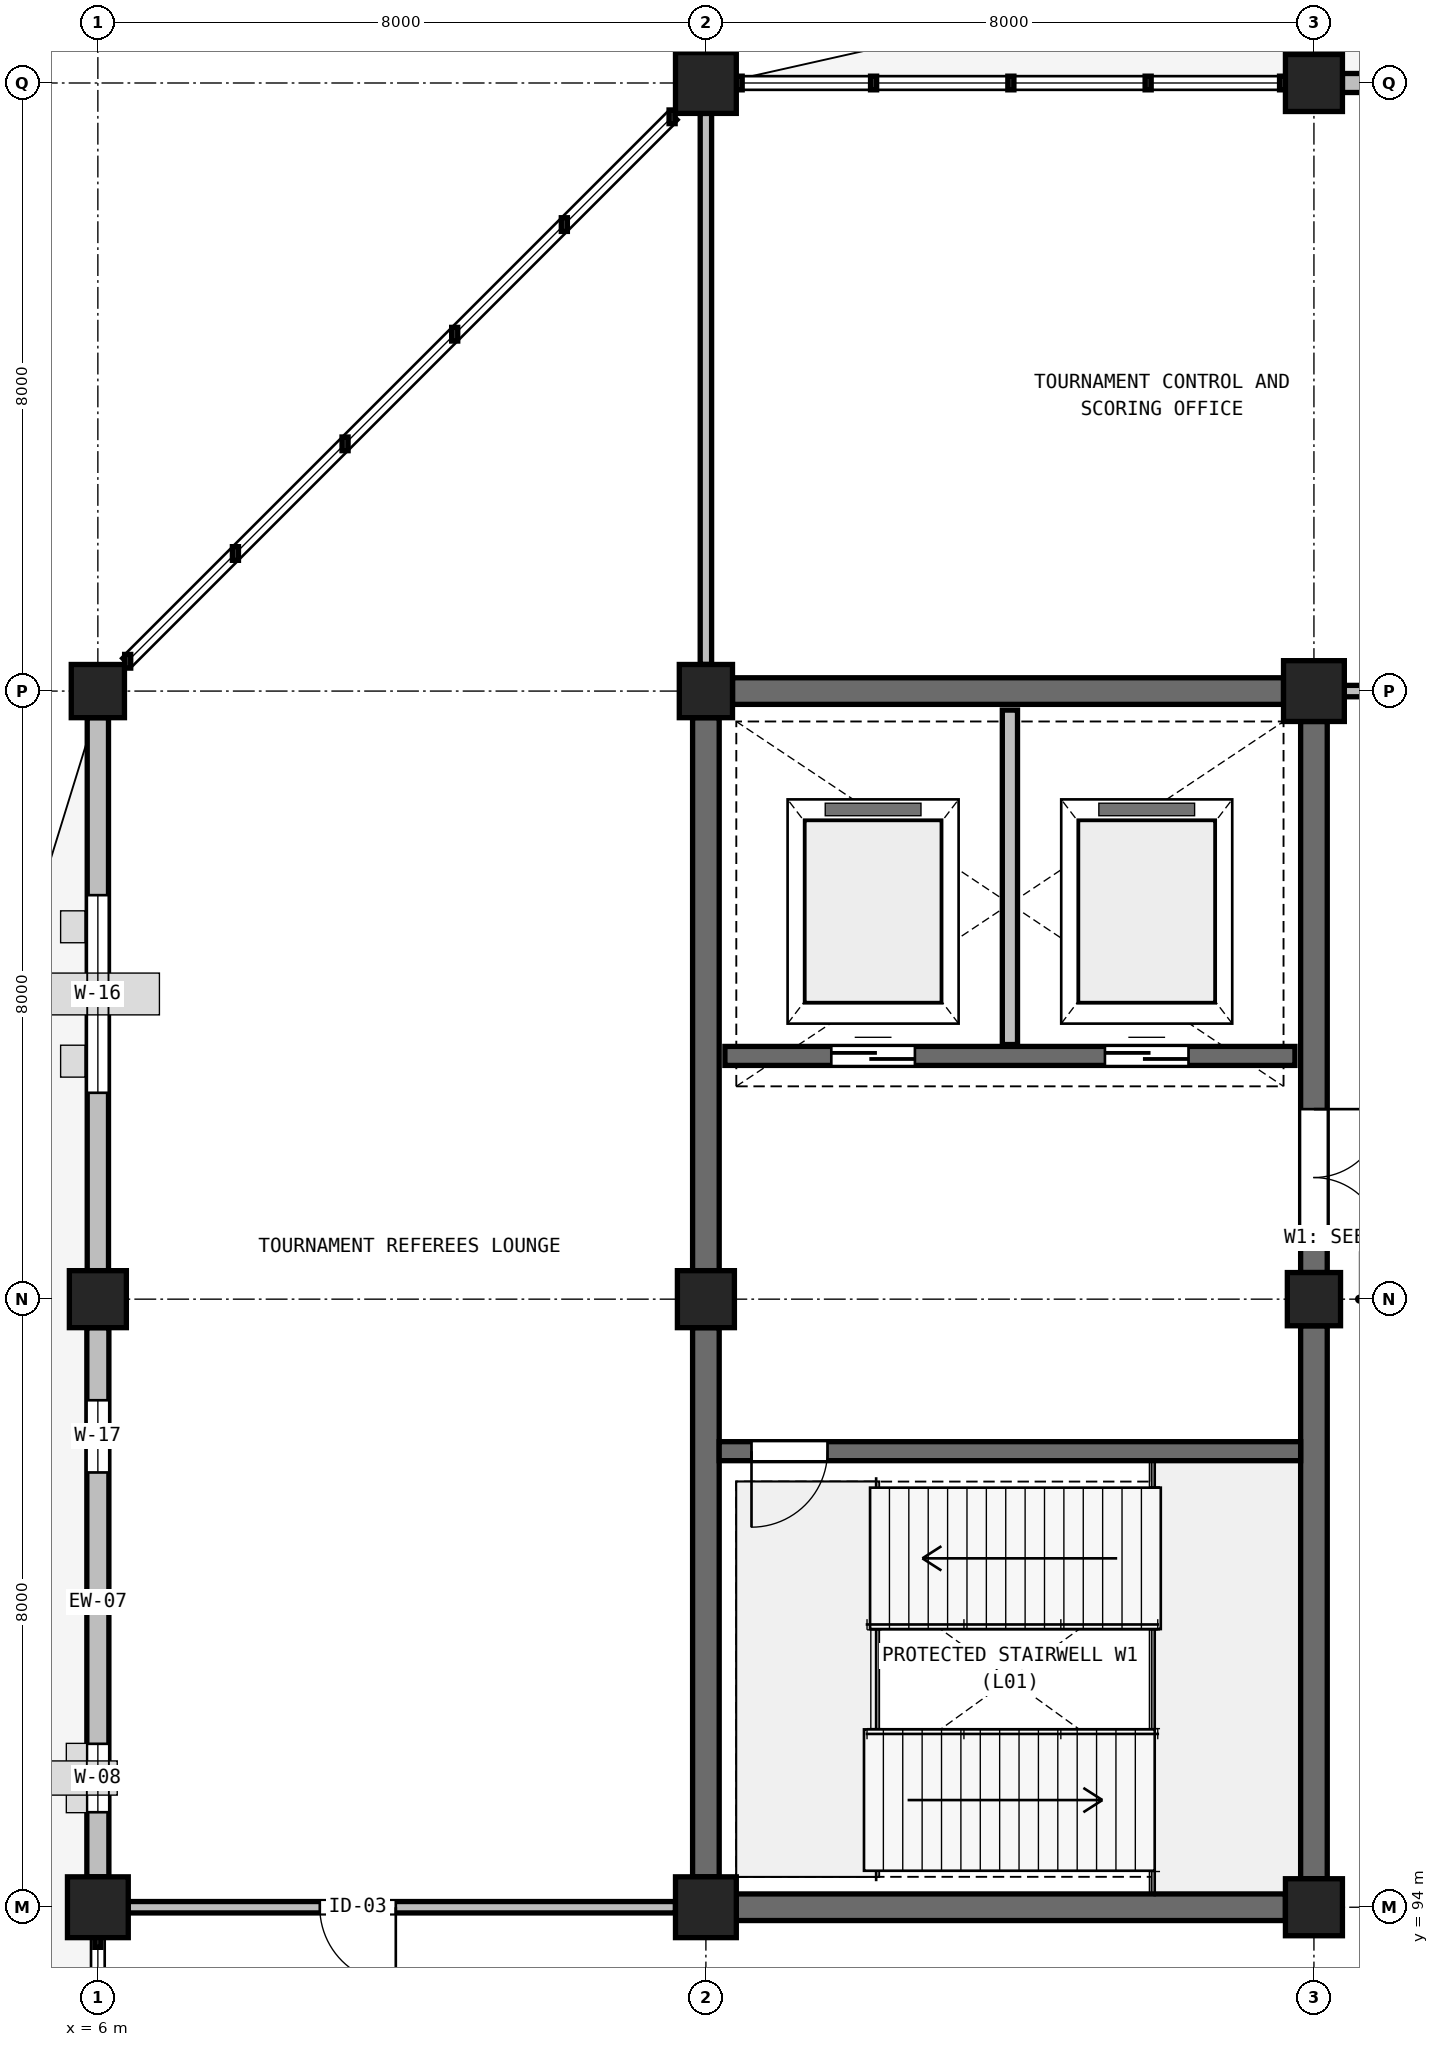
"""IFC4 building model, lengths in metres.
Left out: names, types, materials, properties, quantities, classifications, styles, units other than length and angle.
Written with IfcOpenShell. Run it as: python <this file> out.ifc"""

import sys

from ifc_helpers import new_model, si_unit, direction, frame, frame_2d, origin, origin_2d, place, context, subcontext, project, spatial, rectangle, extrude, element, fill, save


model = new_model("IFC4")
c1 = context("Model", 3, precision=1e-05, world=origin(), true_north=direction((0.0, 1.0)))
c2 = subcontext(c1, "Body", "Model", "MODEL_VIEW")
j1 = project(units=[si_unit("LENGTHUNIT", "METRE"), si_unit("PLANEANGLEUNIT", "RADIAN")], contexts=[c1])
p1 = place(None, origin())
s1 = spatial("IfcSite", under=j1, at=p1, CompositionType="ELEMENT")
p2 = place(p1, origin())
s2 = spatial("IfcBuilding", under=s1, at=p2, CompositionType="ELEMENT")
p3 = place(p2, frame((0.0, 0.0, 5.4)))
s3 = spatial("IfcBuildingStorey", under=s2, at=p3, CompositionType="ELEMENT", Elevation=5.4)
p4 = place(p3, frame((6.0, 94.0, 0.0), z_axis=(0.0, 0.0, 1.0), x_axis=(1.0, 0.0, 0.0)))
e1 = element("IfcColumn", 1, at=p4, inside=s3, PredefinedType="COLUMN", context=c2, shape_type="SweptSolid", body=[
    extrude(rectangle(XDim=0.8, YDim=0.8, at=origin_2d()), origin(), (0.0, 0.0, 1.0), 5.4),
])
p5 = place(p3, frame((6.0, 102.0, 0.0), z_axis=(0.0, 0.0, 1.0), x_axis=(1.0, 0.0, 0.0)))
e2 = element("IfcColumn", 2, at=p5, inside=s3, PredefinedType="COLUMN", context=c2, shape_type="SweptSolid", body=[
    extrude(rectangle(XDim=0.75, YDim=0.75, at=origin_2d()), origin(), (0.0, 0.0, 1.0), 5.4),
])
p6 = place(p3, frame((6.0, 110.0, 0.0), z_axis=(0.0, 0.0, 1.0), x_axis=(1.0, 0.0, 0.0)))
e3 = element("IfcColumn", 3, at=p6, inside=s3, PredefinedType="COLUMN", context=c2, shape_type="SweptSolid", body=[
    extrude(rectangle(XDim=0.7, YDim=0.7, at=origin_2d()), origin(), (0.0, 0.0, 1.0), 5.4),
])
p7 = place(p3, frame((14.0, 94.0, 0.0), z_axis=(0.0, 0.0, 1.0), x_axis=(1.0, 0.0, 0.0)))
e4 = element("IfcColumn", 4, at=p7, inside=s3, PredefinedType="COLUMN", context=c2, shape_type="SweptSolid", body=[
    extrude(rectangle(XDim=0.8, YDim=0.8, at=origin_2d()), origin(), (0.0, 0.0, 1.0), 5.4),
])
p8 = place(p3, frame((14.0, 102.0, 0.0), z_axis=(0.0, 0.0, 1.0), x_axis=(1.0, 0.0, 0.0)))
e5 = element("IfcColumn", 5, at=p8, inside=s3, PredefinedType="COLUMN", context=c2, shape_type="SweptSolid", body=[
    extrude(rectangle(XDim=0.75, YDim=0.75, at=origin_2d()), origin(), (0.0, 0.0, 1.0), 5.4),
])
p9 = place(p3, frame((14.0, 110.0, 0.0), z_axis=(0.0, 0.0, 1.0), x_axis=(1.0, 0.0, 0.0)))
e6 = element("IfcColumn", 6, at=p9, inside=s3, PredefinedType="COLUMN", context=c2, shape_type="SweptSolid", body=[
    extrude(rectangle(XDim=0.7, YDim=0.7, at=origin_2d()), origin(), (0.0, 0.0, 1.0), 5.4),
])
p10 = place(p3, frame((14.0, 118.0, 0.0), z_axis=(0.0, 0.0, 1.0), x_axis=(1.0, 0.0, 0.0)))
e7 = element("IfcColumn", 7, at=p10, inside=s3, PredefinedType="COLUMN", context=c2, shape_type="SweptSolid", body=[
    extrude(rectangle(XDim=0.8, YDim=0.8, at=origin_2d()), origin(), (0.0, 0.0, 1.0), 5.4),
])
p11 = place(p3, frame((22.0, 94.0, 0.0), z_axis=(0.0, 0.0, 1.0), x_axis=(1.0, 0.0, 0.0)))
e8 = element("IfcColumn", 8, at=p11, inside=s3, PredefinedType="COLUMN", context=c2, shape_type="SweptSolid", body=[
    extrude(rectangle(XDim=0.75, YDim=0.75, at=origin_2d()), origin(), (0.0, 0.0, 1.0), 5.4),
])
p12 = place(p3, frame((22.0, 102.0, 0.0), z_axis=(0.0, 0.0, 1.0), x_axis=(1.0, 0.0, 0.0)))
e9 = element("IfcColumn", 9, at=p12, inside=s3, PredefinedType="COLUMN", context=c2, shape_type="SweptSolid", body=[
    extrude(rectangle(XDim=0.7, YDim=0.7, at=origin_2d()), origin(), (0.0, 0.0, 1.0), 5.4),
])
p13 = place(p3, frame((22.0, 110.0, 0.0), z_axis=(0.0, 0.0, 1.0), x_axis=(1.0, 0.0, 0.0)))
e10 = element("IfcColumn", 10, at=p13, inside=s3, PredefinedType="COLUMN", context=c2, shape_type="SweptSolid", body=[
    extrude(rectangle(XDim=0.8, YDim=0.8, at=origin_2d()), origin(), (0.0, 0.0, 1.0), 5.4),
])
p14 = place(p3, frame((22.0, 118.0, 0.0), z_axis=(0.0, 0.0, 1.0), x_axis=(1.0, 0.0, 0.0)))
e11 = element("IfcColumn", 11, at=p14, inside=s3, PredefinedType="COLUMN", context=c2, shape_type="SweptSolid", body=[
    extrude(rectangle(XDim=0.75, YDim=0.75, at=origin_2d()), origin(), (0.0, 0.0, 1.0), 5.4),
])
p15 = place(p3, frame((22.375, 118.0, 0.0), z_axis=(0.0, 0.0, 1.0), x_axis=(1.0, 0.0, 0.0)))
e12 = element("IfcWall", 12, at=p15, inside=s3, PredefinedType="SOLIDWALL", context=c2, shape_type="SweptSolid", body=[
    extrude(rectangle(XDim=7.275, YDim=0.25, at=frame_2d((3.637, 0.0))), origin(), (0.0, 0.0, 1.0), 4.14),
])
p16 = place(p15, frame((0.85, 0.0, 1.2)))
e13 = element("IfcOpeningElement", 13, at=p16, cuts=e12, PredefinedType="OPENING", context=c2, shape_type="SweptSolid", body=[
    extrude(rectangle(XDim=1.5, YDim=1.5, at=frame_2d((0.75, 0.75))), frame((0.0, 0.135, 0.0), z_axis=(0.0, -1.0, 0.0), x_axis=(1.0, 0.0, 0.0)), (0.0, 0.0, 1.0), 0.27),
])
p17 = place(p15, frame((4.97, 0.0, 1.05)))
e14 = element("IfcOpeningElement", 14, at=p17, cuts=e12, PredefinedType="OPENING", context=c2, shape_type="SweptSolid", body=[
    extrude(rectangle(XDim=1.35, YDim=1.65, at=frame_2d((0.675, 0.825))), frame((0.0, 0.135, 0.0), z_axis=(0.0, -1.0, 0.0), x_axis=(1.0, 0.0, 0.0)), (0.0, 0.0, 1.0), 0.27),
])
p18 = place(p3, frame((6.0, 94.4, 0.0), z_axis=(0.0, 0.0, 1.0), x_axis=(0.0, 1.0, 0.0)))
e15 = element("IfcWall", 15, at=p18, inside=s3, PredefinedType="SOLIDWALL", context=c2, shape_type="SweptSolid", body=[
    extrude(rectangle(XDim=7.225, YDim=0.29, at=frame_2d((3.613, 0.0))), origin(), (0.0, 0.0, 1.0), 4.34),
])
p19 = place(p18, frame((0.85, 0.0, 1.5)))
e16 = element("IfcOpeningElement", 16, at=p19, cuts=e15, PredefinedType="OPENING", context=c2, shape_type="SweptSolid", body=[
    extrude(rectangle(XDim=0.9, YDim=1.2, at=frame_2d((0.45, 0.6))), frame((0.0, 0.155, 0.0), z_axis=(0.0, -1.0, 0.0), x_axis=(1.0, 0.0, 0.0)), (0.0, 0.0, 1.0), 0.31),
])
p20 = place(p18, frame((5.32, 0.0, 1.05)))
e17 = element("IfcOpeningElement", 17, at=p20, cuts=e15, PredefinedType="OPENING", context=c2, shape_type="SweptSolid", body=[
    extrude(rectangle(XDim=0.95, YDim=1.65, at=frame_2d((0.475, 0.825))), frame((0.0, 0.155, 0.0), z_axis=(0.0, -1.0, 0.0), x_axis=(1.0, 0.0, 0.0)), (0.0, 0.0, 1.0), 0.31),
])
p21 = place(p3, frame((6.0, 102.375, 0.0), z_axis=(0.0, 0.0, 1.0), x_axis=(0.0, 1.0, 0.0)))
e18 = element("IfcWall", 18, at=p21, inside=s3, PredefinedType="SOLIDWALL", context=c2, shape_type="SweptSolid", body=[
    extrude(rectangle(XDim=7.275, YDim=0.28, at=frame_2d((3.637, 0.0))), origin(), (0.0, 0.0, 1.0), 4.29),
])
p22 = place(p21, frame((2.34, 0.0, 2.65)))
e19 = element("IfcOpeningElement", 19, at=p22, cuts=e18, PredefinedType="OPENING", context=c2, shape_type="SweptSolid", body=[
    extrude(rectangle(XDim=2.6, YDim=1.1, at=frame_2d((1.3, 0.55))), frame((0.0, 0.15, 0.0), z_axis=(0.0, -1.0, 0.0), x_axis=(1.0, 0.0, 0.0)), (0.0, 0.0, 1.0), 0.3),
])
p23 = place(p3, frame((14.4, 94.0, 0.0), z_axis=(0.0, 0.0, 1.0), x_axis=(1.0, 0.0, 0.0)))
e20 = element("IfcWall", 20, at=p23, inside=s3, PredefinedType="SHEAR", context=c2, shape_type="SweptSolid", body=[
    extrude(rectangle(XDim=7.225, YDim=0.35, at=frame_2d((3.613, 0.0))), origin(), (0.0, 0.0, 1.0), 5.18),
])
p24 = place(p3, frame((14.35, 110.0, 0.0), z_axis=(0.0, 0.0, 1.0), x_axis=(1.0, 0.0, 0.0)))
e21 = element("IfcWall", 21, at=p24, inside=s3, PredefinedType="SHEAR", context=c2, shape_type="SweptSolid", body=[
    extrude(rectangle(XDim=7.25, YDim=0.35, at=frame_2d((3.625, 0.0))), origin(), (0.0, 0.0, 1.0), 5.18),
])
p25 = place(p3, frame((14.0, 94.4, 0.0), z_axis=(0.0, 0.0, 1.0), x_axis=(0.0, 1.0, 0.0)))
e22 = element("IfcWall", 22, at=p25, inside=s3, PredefinedType="SHEAR", context=c2, shape_type="SweptSolid", body=[
    extrude(rectangle(XDim=7.225, YDim=0.35, at=frame_2d((3.613, 0.0))), origin(), (0.0, 0.0, 1.0), 5.18),
])
for number, where, z_axis, x_axis in (
    (23, (14.0, 102.375, 0.0), (0.0, 0.0, 1.0), (0.0, 1.0, 0.0)),
    (24, (22.0, 94.375, 0.0), (0.0, 0.0, 1.0), (0.0, 1.0, 0.0)),
):
    element("IfcWall", number, at=place(p3, frame(where, z_axis=z_axis, x_axis=x_axis)), inside=s3, PredefinedType="SHEAR", context=c2, shape_type="SweptSolid", body=[
        extrude(rectangle(XDim=7.275, YDim=0.35, at=frame_2d((3.637, 0.0))), origin(), (0.0, 0.0, 1.0), 5.18),
    ])
p26 = place(p3, frame((22.0, 102.35, 0.0), z_axis=(0.0, 0.0, 1.0), x_axis=(0.0, 1.0, 0.0)))
e25 = element("IfcWall", 25, at=p26, inside=s3, PredefinedType="SHEAR", context=c2, shape_type="SweptSolid", body=[
    extrude(rectangle(XDim=7.25, YDim=0.35, at=frame_2d((3.625, 0.0))), origin(), (0.0, 0.0, 1.0), 5.18),
])
p27 = place(p26, frame((0.35, 0.0, 0.0)))
e26 = element("IfcOpeningElement", 26, at=p27, cuts=e25, PredefinedType="OPENING", context=c2, shape_type="SweptSolid", body=[
    extrude(rectangle(XDim=1.8, YDim=2.2, at=frame_2d((0.9, 1.1))), frame((0.0, 0.185, 0.0), z_axis=(0.0, -1.0, 0.0), x_axis=(1.0, 0.0, 0.0)), (0.0, 0.0, 1.0), 0.37),
])
p28 = place(p3, frame((14.175, 100.0, 0.0), z_axis=(0.0, 0.0, 1.0), x_axis=(1.0, 0.0, 0.0)))
e27 = element("IfcWall", 27, at=p28, inside=s3, PredefinedType="SOLIDWALL", context=c2, shape_type="SweptSolid", body=[
    extrude(rectangle(XDim=7.65, YDim=0.25, at=frame_2d((3.825, 0.0))), origin(), (0.0, 0.0, 1.0), 5.18),
])
p29 = place(p28, frame((0.425, 0.0, 0.0)))
e28 = element("IfcOpeningElement", 28, at=p29, cuts=e27, PredefinedType="OPENING", context=c2, shape_type="SweptSolid", body=[
    extrude(rectangle(XDim=1.0, YDim=2.2, at=frame_2d((0.5, 1.1))), frame((0.0, 0.135, 0.0), z_axis=(0.0, -1.0, 0.0), x_axis=(1.0, 0.0, 0.0)), (0.0, 0.0, 1.0), 0.27),
])
p30 = place(p3, frame((14.25, 105.2, 0.0), z_axis=(0.0, 0.0, 1.0), x_axis=(1.0, 0.0, 0.0)))
e29 = element("IfcWall", 29, at=p30, inside=s3, PredefinedType="SOLIDWALL", context=c2, shape_type="SweptSolid", body=[
    extrude(rectangle(XDim=7.5, YDim=0.25, at=frame_2d((3.75, 0.0))), origin(), (0.0, 0.0, 1.0), 5.18),
])
p31 = place(p30, frame((1.4, 0.0, 0.0)))
e30 = element("IfcOpeningElement", 30, at=p31, cuts=e29, PredefinedType="OPENING", context=c2, shape_type="SweptSolid", body=[
    extrude(rectangle(XDim=1.1, YDim=2.2, at=frame_2d((0.55, 1.1))), frame((0.0, 0.135, 0.0), z_axis=(0.0, -1.0, 0.0), x_axis=(1.0, 0.0, 0.0)), (0.0, 0.0, 1.0), 0.27),
])
p32 = place(p30, frame((5.0, 0.0, 0.0)))
e31 = element("IfcOpeningElement", 31, at=p32, cuts=e29, PredefinedType="OPENING", context=c2, shape_type="SweptSolid", body=[
    extrude(rectangle(XDim=1.1, YDim=2.2, at=frame_2d((0.55, 1.1))), frame((0.0, 0.135, 0.0), z_axis=(0.0, -1.0, 0.0), x_axis=(1.0, 0.0, 0.0)), (0.0, 0.0, 1.0), 0.27),
])
p33 = place(p3, frame((18.0, 105.35, 0.0), z_axis=(0.0, 0.0, 1.0), x_axis=(0.0, 1.0, 0.0)))
e32 = element("IfcWall", 32, at=p33, inside=s3, PredefinedType="PARTITIONING", context=c2, shape_type="SweptSolid", body=[
    extrude(rectangle(XDim=4.4, YDim=0.2, at=frame_2d((2.2, 0.0))), origin(), (0.0, 0.0, 1.0), 5.1),
])
p34 = place(p3, frame((6.4, 94.0, 0.0), z_axis=(0.0, 0.0, 1.0), x_axis=(1.0, 0.0, 0.0)))
e33 = element("IfcWall", 33, at=p34, inside=s3, PredefinedType="PARTITIONING", context=c2, shape_type="SweptSolid", body=[
    extrude(rectangle(XDim=7.2, YDim=0.15, at=frame_2d((3.6, 0.0))), origin(), (0.0, 0.0, 1.0), 4.64),
])
p35 = place(p34, frame((2.52, 0.0, 0.0)))
e34 = element("IfcOpeningElement", 34, at=p35, cuts=e33, PredefinedType="OPENING", context=c2, shape_type="SweptSolid", body=[
    extrude(rectangle(XDim=1.0, YDim=2.15, at=frame_2d((0.5, 1.075))), frame((0.0, 0.085, 0.0), z_axis=(0.0, -1.0, 0.0), x_axis=(1.0, 0.0, 0.0)), (0.0, 0.0, 1.0), 0.17),
])
p36 = place(p3, frame((14.0, 110.35, 0.0), z_axis=(0.0, 0.0, 1.0), x_axis=(0.0, 1.0, 0.0)))
e35 = element("IfcWall", 35, at=p36, inside=s3, PredefinedType="PARTITIONING", context=c2, shape_type="SweptSolid", body=[
    extrude(rectangle(XDim=7.25, YDim=0.15, at=frame_2d((3.625, 0.0))), origin(), (0.0, 0.0, 1.0), 4.39),
])
p37 = place(p3, frame((22.4, 110.0, 0.0), z_axis=(0.0, 0.0, 1.0), x_axis=(1.0, 0.0, 0.0)))
e36 = element("IfcWall", 36, at=p37, inside=s3, PredefinedType="PARTITIONING", context=c2, shape_type="SweptSolid", body=[
    extrude(rectangle(XDim=3.6, YDim=0.15, at=frame_2d((1.8, 0.0))), origin(), (0.0, 0.0, 1.0), 4.34),
])
p38 = place(p37, frame((1.08, 0.0, 0.0)))
e37 = element("IfcOpeningElement", 37, at=p38, cuts=e36, PredefinedType="OPENING", context=c2, shape_type="SweptSolid", body=[
    extrude(rectangle(XDim=1.5, YDim=2.2, at=frame_2d((0.75, 1.1))), frame((0.0, 0.085, 0.0), z_axis=(0.0, -1.0, 0.0), x_axis=(1.0, 0.0, 0.0)), (0.0, 0.0, 1.0), 0.17),
])
p39 = place(p19, origin())
e38 = element("IfcWindow", 38, at=p39, inside=s3, PartitioningType="SINGLE_PANEL", PredefinedType="WINDOW", context=c2, shape_type="SweptSolid", body=[
    extrude(rectangle(XDim=0.9, YDim=1.2, at=frame_2d((0.45, 0.6))), frame((0.0, 0.03, 0.0), z_axis=(0.0, -1.0, 0.0), x_axis=(1.0, 0.0, 0.0)), (0.0, 0.0, 1.0), 0.06),
])
fill(e16, e38)
p40 = place(p20, origin())
e39 = element("IfcWindow", 39, at=p40, inside=s3, PartitioningType="SINGLE_PANEL", PredefinedType="WINDOW", context=c2, shape_type="SweptSolid", body=[
    extrude(rectangle(XDim=0.95, YDim=1.65, at=frame_2d((0.475, 0.825))), frame((0.0, 0.03, 0.0), z_axis=(0.0, -1.0, 0.0), x_axis=(1.0, 0.0, 0.0)), (0.0, 0.0, 1.0), 0.06),
])
fill(e17, e39)
p41 = place(p22, origin())
e40 = element("IfcWindow", 40, at=p41, inside=s3, PartitioningType="SINGLE_PANEL", PredefinedType="WINDOW", context=c2, shape_type="SweptSolid", body=[
    extrude(rectangle(XDim=2.6, YDim=1.1, at=frame_2d((1.3, 0.55))), frame((0.0, 0.03, 0.0), z_axis=(0.0, -1.0, 0.0), x_axis=(1.0, 0.0, 0.0)), (0.0, 0.0, 1.0), 0.06),
])
fill(e19, e40)
p42 = place(p27, frame((1.8, 0.0, 0.0), z_axis=(0.0, 0.0, 1.0), x_axis=(-1.0, 0.0, 0.0)))
e41 = element("IfcDoor", 41, at=p42, inside=s3, OperationType="DOUBLE_DOOR_SINGLE_SWING", PredefinedType="DOOR", context=c2, shape_type="SweptSolid", body=[
    extrude(rectangle(XDim=1.8, YDim=2.2, at=frame_2d((0.9, 1.1))), frame((0.0, 0.025, 0.0), z_axis=(0.0, -1.0, 0.0), x_axis=(1.0, 0.0, 0.0)), (0.0, 0.0, 1.0), 0.05),
])
fill(e26, e41)
p43 = place(p29, frame((1.0, 0.0, 0.0), z_axis=(0.0, 0.0, 1.0), x_axis=(-1.0, 0.0, 0.0)))
e42 = element("IfcDoor", 42, at=p43, inside=s3, OperationType="SINGLE_SWING_LEFT", PredefinedType="DOOR", context=c2, shape_type="SweptSolid", body=[
    extrude(rectangle(XDim=1.0, YDim=2.2, at=frame_2d((0.5, 1.1))), frame((0.0, 0.025, 0.0), z_axis=(0.0, -1.0, 0.0), x_axis=(1.0, 0.0, 0.0)), (0.0, 0.0, 1.0), 0.05),
])
fill(e28, e42)
p44 = place(p31, origin())
e43 = element("IfcDoor", 43, at=p44, inside=s3, OperationType="DOUBLE_DOOR_SLIDING", PredefinedType="DOOR", context=c2, shape_type="SweptSolid", body=[
    extrude(rectangle(XDim=1.1, YDim=2.2, at=frame_2d((0.55, 1.1))), frame((0.0, 0.025, 0.0), z_axis=(0.0, -1.0, 0.0), x_axis=(1.0, 0.0, 0.0)), (0.0, 0.0, 1.0), 0.05),
])
fill(e30, e43)
p45 = place(p32, origin())
e44 = element("IfcDoor", 44, at=p45, inside=s3, OperationType="DOUBLE_DOOR_SLIDING", PredefinedType="DOOR", context=c2, shape_type="SweptSolid", body=[
    extrude(rectangle(XDim=1.1, YDim=2.2, at=frame_2d((0.55, 1.1))), frame((0.0, 0.025, 0.0), z_axis=(0.0, -1.0, 0.0), x_axis=(1.0, 0.0, 0.0)), (0.0, 0.0, 1.0), 0.05),
])
fill(e31, e44)
p46 = place(p35, frame((1.0, 0.0, 0.0), z_axis=(0.0, 0.0, 1.0), x_axis=(-1.0, 0.0, 0.0)))
e45 = element("IfcDoor", 45, at=p46, inside=s3, OperationType="SINGLE_SWING_RIGHT", PredefinedType="DOOR", context=c2, shape_type="SweptSolid", body=[
    extrude(rectangle(XDim=1.0, YDim=2.15, at=frame_2d((0.5, 1.075))), frame((0.0, 0.025, 0.0), z_axis=(0.0, -1.0, 0.0), x_axis=(1.0, 0.0, 0.0)), (0.0, 0.0, 1.0), 0.05),
])
fill(e34, e45)
save(model, sys.argv[1])
